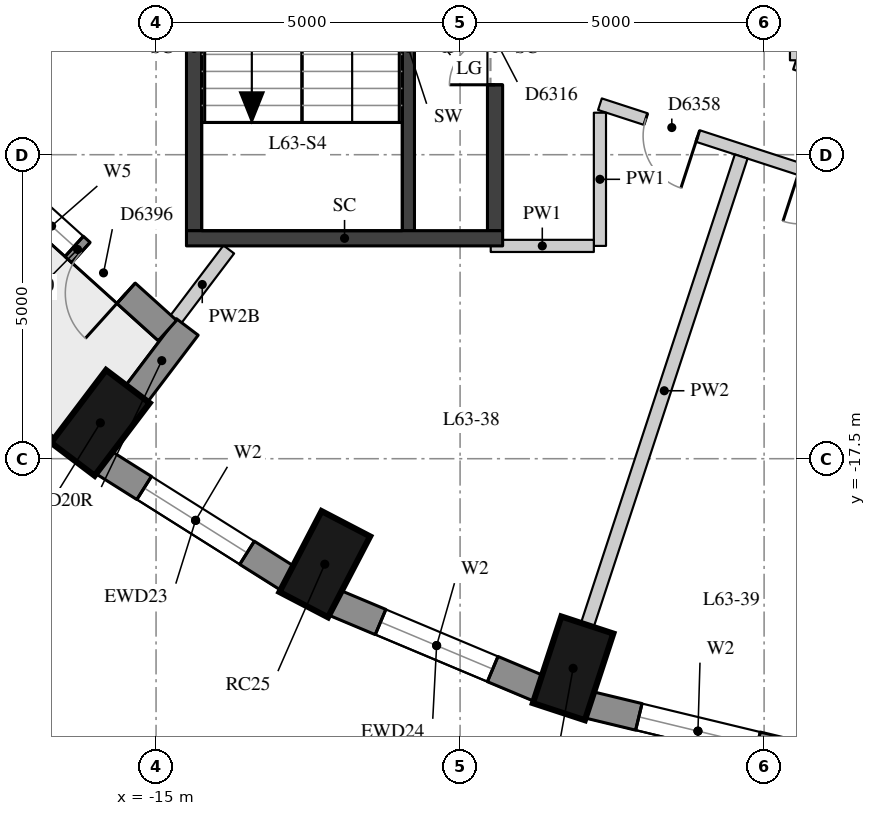
"""IFC4 building model, lengths in metres.
Left out: names, types, materials, properties, quantities, classifications, styles, units other than length and angle.
Written with IfcOpenShell. Run it as: python <this file> out.ifc"""

import sys

from ifc_helpers import new_model, si_unit, direction, frame, frame_2d, origin, origin_2d, place, context, subcontext, project, spatial, rectangle, extrude, element, fill, save


model = new_model("IFC4")
c1 = context("Model", 3, precision=1e-05, world=origin(), true_north=direction((0.0, 1.0)))
c2 = subcontext(c1, "Body", "Model", "MODEL_VIEW")
j1 = project(units=[si_unit("LENGTHUNIT", "METRE"), si_unit("PLANEANGLEUNIT", "RADIAN")], contexts=[c1])
p1 = place(None, origin())
s1 = spatial("IfcSite", under=j1, at=p1, CompositionType="ELEMENT")
p2 = place(p1, origin())
s2 = spatial("IfcBuilding", under=s1, at=p2, CompositionType="ELEMENT")
p3 = place(p2, frame((0.0, 0.0, 222.2)))
s3 = spatial("IfcBuildingStorey", under=s2, at=p3, CompositionType="ELEMENT", Elevation=222.2)
for number, where, z_axis, x_axis in (
    (1, (-15.916, -16.911, 0.0), (0.0, 0.0, 1.0), (-0.604, -0.797, 0.0)),
    (2, (-12.225, -19.235, 0.0), (0.0, 0.0, 1.0), (-0.462, -0.887, 0.0)),
    (3, (-8.141, -20.948, 0.0), (0.0, 0.0, 1.0), (-0.312, -0.95, 0.0)),
):
    element("IfcColumn", number, at=place(p3, frame(where, z_axis=z_axis, x_axis=x_axis)), inside=s3, PredefinedType="COLUMN", context=c2, shape_type="SweptSolid", body=[
        extrude(rectangle(XDim=1.5, YDim=0.9, at=origin_2d()), origin(), (0.0, 0.0, 1.0), 3.3),
    ])
p4 = place(p3, frame((-15.867, -17.559, 0.0), z_axis=(0.0, 0.0, 1.0), x_axis=(0.84616917791, -0.532914366813, 0.0)))
e4 = element("IfcWall", 4, at=p4, inside=s3, PredefinedType="SOLIDWALL", context=c2, shape_type="SweptSolid", body=[
    extrude(rectangle(XDim=3.587, YDim=0.45, at=frame_2d((1.793, 0.0))), origin(), (0.0, 0.0, 1.0), 3.02),
])
p5 = place(p4, frame((0.793, 0.0, 0.4)))
e5 = element("IfcOpeningElement", 5, at=p5, cuts=e4, PredefinedType="OPENING", context=c2, shape_type="SweptSolid", body=[
    extrude(rectangle(XDim=2.0, YDim=1.75, at=frame_2d((1.0, 0.875))), frame((0.0, 0.235, 0.0), z_axis=(0.0, -1.0, 0.0), x_axis=(1.0, 0.0, 0.0)), (0.0, 0.0, 1.0), 0.47),
])
p6 = place(p3, frame((-12.069, -19.867, 0.0), z_axis=(0.0, 0.0, 1.0), x_axis=(0.922168222612, -0.386789050006, 0.0)))
e6 = element("IfcWall", 6, at=p6, inside=s3, PredefinedType="SOLIDWALL", context=c2, shape_type="SweptSolid", body=[
    extrude(rectangle(XDim=3.651, YDim=0.45, at=frame_2d((1.825, 0.0))), origin(), (0.0, 0.0, 1.0), 3.02),
])
p7 = place(p6, frame((0.825, 0.0, 0.4)))
e7 = element("IfcOpeningElement", 7, at=p7, cuts=e6, PredefinedType="OPENING", context=c2, shape_type="SweptSolid", body=[
    extrude(rectangle(XDim=2.0, YDim=1.75, at=frame_2d((1.0, 0.875))), frame((0.0, 0.235, 0.0), z_axis=(0.0, -1.0, 0.0), x_axis=(1.0, 0.0, 0.0)), (0.0, 0.0, 1.0), 0.47),
])
p8 = place(p3, frame((-7.885, -21.547, 0.0), z_axis=(0.0, 0.0, 1.0), x_axis=(0.9721584944, -0.234324266275, 0.0)))
e8 = element("IfcWall", 8, at=p8, inside=s3, PredefinedType="SOLIDWALL", context=c2, shape_type="SweptSolid", body=[
    extrude(rectangle(XDim=3.698, YDim=0.45, at=frame_2d((1.849, 0.0))), origin(), (0.0, 0.0, 1.0), 3.02),
])
p9 = place(p8, frame((0.849, 0.0, 0.4)))
e9 = element("IfcOpeningElement", 9, at=p9, cuts=e8, PredefinedType="OPENING", context=c2, shape_type="SweptSolid", body=[
    extrude(rectangle(XDim=2.0, YDim=1.75, at=frame_2d((1.0, 0.875))), frame((0.0, 0.235, 0.0), z_axis=(0.0, -1.0, 0.0), x_axis=(1.0, 0.0, 0.0)), (0.0, 0.0, 1.0), 0.47),
])
p10 = place(p3, frame((-15.326, -16.442, 0.0), z_axis=(0.0, 0.0, 1.0), x_axis=(0.603644757989, 0.797253414011, 0.0)))
e10 = element("IfcWall", 10, at=p10, inside=s3, PredefinedType="SOLIDWALL", context=c2, shape_type="SweptSolid", body=[
    extrude(rectangle(XDim=1.391, YDim=0.45, at=frame_2d((0.695, 0.0))), origin(), (0.0, 0.0, 1.0), 2.57),
])
p11 = place(p3, frame((-17.769, -12.725, 0.0), z_axis=(0.0, 0.0, 1.0), x_axis=(0.742485377568, -0.669862272484, 0.0)))
e11 = element("IfcWall", 11, at=p11, inside=s3, PredefinedType="SOLIDWALL", context=c2, shape_type="SweptSolid", body=[
    extrude(rectangle(XDim=3.98, YDim=0.45, at=frame_2d((1.99, 0.0))), origin(), (0.0, 0.0, 1.0), 3.02),
])
p12 = place(p11, frame((0.915, 0.0, 0.4)))
e12 = element("IfcOpeningElement", 12, at=p12, cuts=e11, PredefinedType="OPENING", context=c2, shape_type="SweptSolid", body=[
    extrude(rectangle(XDim=1.0, YDim=1.75, at=frame_2d((0.5, 0.875))), frame((0.0, 0.235, 0.0), z_axis=(0.0, -1.0, 0.0), x_axis=(1.0, 0.0, 0.0)), (0.0, 0.0, 1.0), 0.47),
])
p13 = place(p11, frame((2.065, 0.0, 0.0)))
e13 = element("IfcOpeningElement", 13, at=p13, cuts=e11, PredefinedType="OPENING", context=c2, shape_type="SweptSolid", body=[
    extrude(rectangle(XDim=1.0, YDim=2.15, at=frame_2d((0.5, 1.075))), frame((0.0, 0.235, 0.0), z_axis=(0.0, -1.0, 0.0), x_axis=(1.0, 0.0, 0.0)), (0.0, 0.0, 1.0), 0.47),
])
p14 = place(p3, frame((-10.85, -13.75, 0.0), z_axis=(0.0, 0.0, 1.0), x_axis=(0.0, 1.0, 0.0)))
e14 = element("IfcWall", 14, at=p14, inside=s3, PredefinedType="SHEAR", context=c2, shape_type="SweptSolid", body=[
    extrude(rectangle(XDim=6.0, YDim=0.2, at=frame_2d((3.0, 0.0))), origin(), (0.0, 0.0, 1.0), 3.02),
])
p15 = place(p14, frame((4.4, 0.0, 0.0)))
e15 = element("IfcOpeningElement", 15, at=p15, cuts=e14, PredefinedType="OPENING", context=c2, shape_type="SweptSolid", body=[
    extrude(rectangle(XDim=1.5, YDim=2.1, at=frame_2d((0.75, 1.05))), frame((0.0, 0.11, 0.0), z_axis=(0.0, -1.0, 0.0), x_axis=(1.0, 0.0, 0.0)), (0.0, 0.0, 1.0), 0.22),
])
p16 = place(p3, frame((-14.375, -13.75, -0.28), z_axis=(0.0, 0.0, 1.0), x_axis=(0.0, 1.0, 0.0)))
e16 = element("IfcWall", 16, at=p16, inside=s3, PredefinedType="SHEAR", context=c2, shape_type="SweptSolid", body=[
    extrude(rectangle(XDim=6.0, YDim=0.25, at=frame_2d((3.0, 0.0))), origin(), (0.0, 0.0, 1.0), 3.3),
])
p17 = place(p3, frame((-9.425, -13.75, -0.28), z_axis=(0.0, 0.0, 1.0), x_axis=(0.0, 1.0, 0.0)))
e17 = element("IfcWall", 17, at=p17, inside=s3, PredefinedType="SHEAR", context=c2, shape_type="SweptSolid", body=[
    extrude(rectangle(XDim=6.0, YDim=0.25, at=frame_2d((3.0, 0.0))), origin(), (0.0, 0.0, 1.0), 3.3),
])
p18 = place(p17, frame((2.4, 0.0, 0.28)))
e18 = element("IfcOpeningElement", 18, at=p18, cuts=e17, PredefinedType="OPENING", context=c2, shape_type="SweptSolid", body=[
    extrude(rectangle(XDim=1.5, YDim=2.1, at=frame_2d((0.75, 1.05))), frame((0.0, 0.135, 0.0), z_axis=(0.0, -1.0, 0.0), x_axis=(1.0, 0.0, 0.0)), (0.0, 0.0, 1.0), 0.27),
])
p19 = place(p3, frame((-14.5, -13.875, -0.28), z_axis=(0.0, 0.0, 1.0), x_axis=(1.0, 0.0, 0.0)))
e19 = element("IfcWall", 19, at=p19, inside=s3, PredefinedType="SHEAR", context=c2, shape_type="SweptSolid", body=[
    extrude(rectangle(XDim=5.2, YDim=0.25, at=frame_2d((2.6, 0.0))), origin(), (0.0, 0.0, 1.0), 3.3),
])
p20 = place(p3, frame((0.605, -14.369, 0.0), z_axis=(0.0, 0.0, 1.0), x_axis=(-0.950994614205, 0.309207444529, 0.0)))
e20 = element("IfcWall", 20, at=p20, inside=s3, PredefinedType="PARTITIONING", context=c2, shape_type="SweptSolid", body=[
    extrude(rectangle(XDim=8.733, YDim=0.2, at=frame_2d((4.366, 0.0))), origin(), (0.0, 0.0, 1.0), 3.02),
])
p21 = place(p20, frame((7.04, 0.0, 0.0)))
e21 = element("IfcOpeningElement", 21, at=p21, cuts=e20, PredefinedType="OPENING", context=c2, shape_type="SweptSolid", body=[
    extrude(rectangle(XDim=0.9, YDim=2.1, at=frame_2d((0.45, 1.05))), frame((0.0, 0.11, 0.0), z_axis=(0.0, -1.0, 0.0), x_axis=(1.0, 0.0, 0.0)), (0.0, 0.0, 1.0), 0.22),
])
p22 = place(p20, frame((4.375, 0.0, 0.0)))
e22 = element("IfcOpeningElement", 22, at=p22, cuts=e20, PredefinedType="OPENING", context=c2, shape_type="SweptSolid", body=[
    extrude(rectangle(XDim=0.9, YDim=2.1, at=frame_2d((0.45, 1.05))), frame((0.0, 0.11, 0.0), z_axis=(0.0, -1.0, 0.0), x_axis=(1.0, 0.0, 0.0)), (0.0, 0.0, 1.0), 0.22),
])
p23 = place(p20, frame((1.145, 0.0, 0.0)))
e23 = element("IfcOpeningElement", 23, at=p23, cuts=e20, PredefinedType="OPENING", context=c2, shape_type="SweptSolid", body=[
    extrude(rectangle(XDim=0.9, YDim=2.1, at=frame_2d((0.45, 1.05))), frame((0.0, 0.11, 0.0), z_axis=(0.0, -1.0, 0.0), x_axis=(1.0, 0.0, 0.0)), (0.0, 0.0, 1.0), 0.22),
])
p24 = place(p3, frame((-7.7, -11.809, 0.0), z_axis=(0.0, 0.0, 1.0), x_axis=(0.0, -1.0, 0.0)))
e24 = element("IfcWall", 24, at=p24, inside=s3, PredefinedType="PARTITIONING", context=c2, shape_type="SweptSolid", body=[
    extrude(rectangle(XDim=2.191, YDim=0.2, at=frame_2d((1.095, 0.0))), origin(), (0.0, 0.0, 1.0), 3.02),
])
p25 = place(p3, frame((-7.8, -14.0, 0.0), z_axis=(0.0, 0.0, 1.0), x_axis=(-1.0, 0.0, 0.0)))
e25 = element("IfcWall", 25, at=p25, inside=s3, PredefinedType="PARTITIONING", context=c2, shape_type="SweptSolid", body=[
    extrude(rectangle(XDim=1.696, YDim=0.2, at=frame_2d((0.848, 0.0))), origin(), (0.0, 0.0, 1.0), 3.02),
])
p26 = place(p3, frame((0.705, -12.7, 0.0), z_axis=(0.0, 0.0, 1.0), x_axis=(-0.952035530576, 0.305987497327, 0.0)))
e26 = element("IfcWall", 26, at=p26, inside=s3, PredefinedType="PARTITIONING", context=c2, shape_type="SweptSolid", body=[
    extrude(rectangle(XDim=5.467, YDim=0.15, at=frame_2d((2.733, 0.0))), origin(), (0.0, 0.0, 1.0), 3.02),
])
p27 = place(p3, frame((-4.5, -10.947, 0.0), z_axis=(0.0, 0.0, 1.0), x_axis=(0.0, 1.0, 0.0)))
e27 = element("IfcWall", 27, at=p27, inside=s3, PredefinedType="PARTITIONING", context=c2, shape_type="SweptSolid", body=[
    extrude(rectangle(XDim=3.085, YDim=0.15, at=frame_2d((1.542, 0.0))), origin(), (0.0, 0.0, 1.0), 3.02),
])
p28 = place(p3, frame((-14.677, -15.211, 0.0), z_axis=(0.0, 0.0, 1.0), x_axis=(0.60355868562, 0.797318576864, 0.0)))
e28 = element("IfcWall", 28, at=p28, inside=s3, PredefinedType="PARTITIONING", context=c2, shape_type="SweptSolid", body=[
    extrude(rectangle(XDim=1.447, YDim=0.22, at=frame_2d((0.723, 0.0))), origin(), (0.0, 0.0, 1.0), 2.57),
])
p29 = place(p3, frame((-7.907, -20.235, 0.0), z_axis=(0.0, 0.0, 1.0), x_axis=(0.311998426629, 0.950082618397, 0.0)))
e29 = element("IfcWall", 29, at=p29, inside=s3, PredefinedType="PARTITIONING", context=c2, shape_type="SweptSolid", body=[
    extrude(rectangle(XDim=8.111, YDim=0.22, at=frame_2d((4.055, 0.0))), origin(), (0.0, 0.0, 1.0), 3.02),
])
p30 = place(p5, origin())
e30 = element("IfcWindow", 30, at=p30, inside=s3, PartitioningType="SINGLE_PANEL", PredefinedType="WINDOW", context=c2, shape_type="SweptSolid", body=[
    extrude(rectangle(XDim=2.0, YDim=1.75, at=frame_2d((1.0, 0.875))), frame((0.0, 0.035, 0.0), z_axis=(0.0, -1.0, 0.0), x_axis=(1.0, 0.0, 0.0)), (0.0, 0.0, 1.0), 0.06),
])
fill(e5, e30)
p31 = place(p7, origin())
e31 = element("IfcWindow", 31, at=p31, inside=s3, PartitioningType="SINGLE_PANEL", PredefinedType="WINDOW", context=c2, shape_type="SweptSolid", body=[
    extrude(rectangle(XDim=2.0, YDim=1.75, at=frame_2d((1.0, 0.875))), frame((0.0, 0.035, 0.0), z_axis=(0.0, -1.0, 0.0), x_axis=(1.0, 0.0, 0.0)), (0.0, 0.0, 1.0), 0.06),
])
fill(e7, e31)
p32 = place(p9, origin())
e32 = element("IfcWindow", 32, at=p32, inside=s3, PartitioningType="SINGLE_PANEL", PredefinedType="WINDOW", context=c2, shape_type="SweptSolid", body=[
    extrude(rectangle(XDim=2.0, YDim=1.75, at=frame_2d((1.0, 0.875))), frame((0.0, 0.035, 0.0), z_axis=(0.0, -1.0, 0.0), x_axis=(1.0, 0.0, 0.0)), (0.0, 0.0, 1.0), 0.06),
])
fill(e9, e32)
p33 = place(p12, origin())
e33 = element("IfcWindow", 33, at=p33, inside=s3, PartitioningType="SINGLE_PANEL", PredefinedType="WINDOW", context=c2, shape_type="SweptSolid", body=[
    extrude(rectangle(XDim=1.0, YDim=1.75, at=frame_2d((0.5, 0.875))), frame((0.0, 0.035, 0.0), z_axis=(0.0, -1.0, 0.0), x_axis=(1.0, 0.0, 0.0)), (0.0, 0.0, 1.0), 0.06),
])
fill(e12, e33)
p34 = place(p13, frame((1.0, 0.0, 0.0), z_axis=(0.0, 0.0, 1.0), x_axis=(-1.0, 0.0, 0.0)))
e34 = element("IfcDoor", 34, at=p34, inside=s3, OperationType="SINGLE_SWING_LEFT", PredefinedType="DOOR", context=c2, shape_type="SweptSolid", body=[
    extrude(rectangle(XDim=1.0, YDim=2.15, at=frame_2d((0.5, 1.075))), frame((0.0, 0.075, 0.0), z_axis=(0.0, -1.0, 0.0), x_axis=(1.0, 0.0, 0.0)), (0.0, 0.0, 1.0), 0.05),
])
fill(e13, e34)
p35 = place(p18, origin())
e35 = element("IfcDoor", 35, at=p35, inside=s3, OperationType="DOUBLE_DOOR_SINGLE_SWING", PredefinedType="DOOR", context=c2, shape_type="SweptSolid", body=[
    extrude(rectangle(XDim=1.5, YDim=2.1, at=frame_2d((0.75, 1.05))), frame((0.0, 0.025, 0.0), z_axis=(0.0, -1.0, 0.0), x_axis=(1.0, 0.0, 0.0)), (0.0, 0.0, 1.0), 0.05),
])
fill(e18, e35)
p36 = place(p21, origin())
e36 = element("IfcDoor", 36, at=p36, inside=s3, OperationType="SINGLE_SWING_LEFT", PredefinedType="DOOR", context=c2, shape_type="SweptSolid", body=[
    extrude(rectangle(XDim=0.9, YDim=2.1, at=frame_2d((0.45, 1.05))), frame((0.0, 0.025, 0.0), z_axis=(0.0, -1.0, 0.0), x_axis=(1.0, 0.0, 0.0)), (0.0, 0.0, 1.0), 0.05),
])
fill(e21, e36)
save(model, sys.argv[1])
